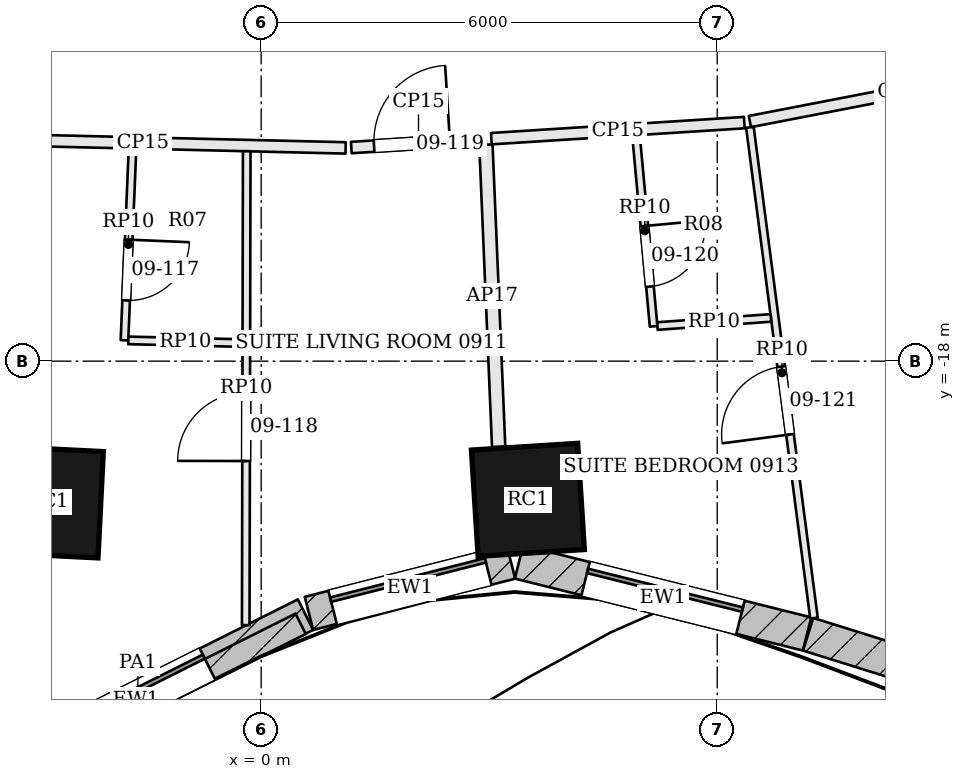
"""IFC4 building model, lengths in metres.
Left out: names, types, materials, properties, quantities, classifications, styles, units other than length and angle.
Written with IfcOpenShell. Run it as: python <this file> out.ifc"""

import sys

from ifc_helpers import new_model, si_unit, direction, frame, frame_2d, origin, origin_2d, place, context, subcontext, project, spatial, rectangle, extrude, element, fill, save


model = new_model("IFC4")
c1 = context("Model", 3, precision=1e-05, world=origin(), true_north=direction((0.0, 1.0)))
c2 = subcontext(c1, "Body", "Model", "MODEL_VIEW")
j1 = project(units=[si_unit("LENGTHUNIT", "METRE"), si_unit("PLANEANGLEUNIT", "RADIAN")], contexts=[c1])
p1 = place(None, origin())
s1 = spatial("IfcSite", under=j1, at=p1, CompositionType="ELEMENT")
p2 = place(p1, origin())
s2 = spatial("IfcBuilding", under=s1, at=p2, CompositionType="ELEMENT")
p3 = place(p2, frame((0.0, 0.0, 48.3)))
s3 = spatial("IfcBuildingStorey", under=s2, at=p3, CompositionType="ELEMENT", Elevation=48.3)
for number, where, z_axis, x_axis in (
    (1, (-2.811, -19.854, 0.0), (0.0, 0.0, 1.0), (0.999, -0.05, 0.0)),
    (2, (3.509, -19.824, 0.0), (0.0, 0.0, 1.0), (0.998, 0.063, 0.0)),
):
    element("IfcColumn", number, at=place(p3, frame(where, z_axis=z_axis, x_axis=x_axis)), inside=s3, PredefinedType="COLUMN", context=c2, shape_type="SweptSolid", body=[
        extrude(rectangle(XDim=1.4, YDim=1.4, at=origin_2d()), origin(), (0.0, 0.0, 1.0), 3.6),
    ])
p4 = place(p3, frame((-3.877, -23.568, 0.0), z_axis=(0.0, 0.0, 1.0), x_axis=(0.894241088759, 0.447585606532, 0.0)))
e3 = element("IfcWall", 3, at=p4, inside=s3, PredefinedType="SOLIDWALL", context=c2, shape_type="SweptSolid", body=[
    extrude(rectangle(XDim=4.987, YDim=0.45, at=frame_2d((2.494, 0.0))), origin(), (0.0, 0.0, 1.0), 3.4),
])
p5 = place(p4, frame((1.444, 0.0, 0.9)))
e4 = element("IfcOpeningElement", 4, at=p5, cuts=e3, PredefinedType="OPENING", context=c2, shape_type="SweptSolid", body=[
    extrude(rectangle(XDim=2.1, YDim=2.0, at=frame_2d((1.05, 1.0))), frame((0.0, 0.235, 0.0), z_axis=(0.0, -1.0, 0.0), x_axis=(1.0, 0.0, 0.0)), (0.0, 0.0, 1.0), 0.47),
])
p6 = place(p3, frame((0.628, -21.319, 0.0), z_axis=(0.0, 0.0, 1.0), x_axis=(0.969240543873, 0.246115355295, 0.0)))
e5 = element("IfcWall", 5, at=p6, inside=s3, PredefinedType="SOLIDWALL", context=c2, shape_type="SweptSolid", body=[
    extrude(rectangle(XDim=2.743, YDim=0.45, at=frame_2d((1.372, 0.0))), origin(), (0.0, 0.0, 1.0), 3.4),
])
p7 = place(p6, frame((0.321, 0.0, 0.9)))
e6 = element("IfcOpeningElement", 6, at=p7, cuts=e5, PredefinedType="OPENING", context=c2, shape_type="SweptSolid", body=[
    extrude(rectangle(XDim=2.1, YDim=2.0, at=frame_2d((1.05, 1.0))), frame((0.0, 0.235, 0.0), z_axis=(0.0, -1.0, 0.0), x_axis=(1.0, 0.0, 0.0)), (0.0, 0.0, 1.0), 0.47),
])
p8 = place(p3, frame((3.392, -20.642, 0.0), z_axis=(0.0, 0.0, 1.0), x_axis=(0.970168229467, -0.242432684539, 0.0)))
e7 = element("IfcWall", 7, at=p8, inside=s3, PredefinedType="SOLIDWALL", context=c2, shape_type="SweptSolid", body=[
    extrude(rectangle(XDim=3.906, YDim=0.45, at=frame_2d((1.953, 0.0))), origin(), (0.0, 0.0, 1.0), 3.4),
])
p9 = place(p8, frame((0.903, 0.0, 0.9)))
e8 = element("IfcOpeningElement", 8, at=p9, cuts=e7, PredefinedType="OPENING", context=c2, shape_type="SweptSolid", body=[
    extrude(rectangle(XDim=2.1, YDim=2.0, at=frame_2d((1.05, 1.0))), frame((0.0, 0.235, 0.0), z_axis=(0.0, -1.0, 0.0), x_axis=(1.0, 0.0, 0.0)), (0.0, 0.0, 1.0), 0.47),
])
p10 = place(p3, frame((7.196, -21.593, 0.0), z_axis=(0.0, 0.0, 1.0), x_axis=(0.954471218741, -0.298303021432, 0.0)))
e9 = element("IfcWall", 9, at=p10, inside=s3, PredefinedType="SOLIDWALL", context=c2, shape_type="SweptSolid", body=[
    extrude(rectangle(XDim=4.96, YDim=0.45, at=frame_2d((2.48, 0.0))), origin(), (0.0, 0.0, 1.0), 3.4),
])
p11 = place(p10, frame((1.43, 0.0, 0.9)))
e10 = element("IfcOpeningElement", 10, at=p11, cuts=e9, PredefinedType="OPENING", context=c2, shape_type="SweptSolid", body=[
    extrude(rectangle(XDim=2.1, YDim=2.0, at=frame_2d((1.05, 1.0))), frame((0.0, 0.235, 0.0), z_axis=(0.0, -1.0, 0.0), x_axis=(1.0, 0.0, 0.0)), (0.0, 0.0, 1.0), 0.47),
])
p12 = place(p3, frame((-3.763, -23.599, 3.6), z_axis=(0.0, 0.0, 1.0), x_axis=(0.894243576514, 0.447580636158, 0.0)))
e11 = element("IfcWall", 11, at=p12, inside=s3, PredefinedType="PARAPET", context=c2, shape_type="SweptSolid", body=[
    extrude(rectangle(XDim=4.789, YDim=0.3, at=frame_2d((2.394, 0.0))), origin(), (0.0, 0.0, 1.0), 1.1),
])
p13 = place(p3, frame((-4.221, -15.067, 0.0), z_axis=(0.0, 0.0, 1.0), x_axis=(0.999716725606, -0.023800599639, 0.0)))
e12 = element("IfcWall", 12, at=p13, inside=s3, PredefinedType="PARTITIONING", context=c2, shape_type="SweptSolid", body=[
    extrude(rectangle(XDim=5.334, YDim=0.15, at=frame_2d((2.667, 0.0))), origin(), (0.0, 0.0, 1.0), 2.68),
])
p14 = place(p3, frame((1.186, -15.19, 0.0), z_axis=(0.0, 0.0, 1.0), x_axis=(0.997996397867, 0.063270766108, 0.0)))
e13 = element("IfcWall", 13, at=p14, inside=s3, PredefinedType="PARTITIONING", context=c2, shape_type="SweptSolid", body=[
    extrude(rectangle(XDim=1.771, YDim=0.15, at=frame_2d((0.886, 0.0))), origin(), (0.0, 0.0, 1.0), 2.68),
])
p15 = place(p14, frame((0.3, 0.0, 0.0)))
e14 = element("IfcOpeningElement", 14, at=p15, cuts=e13, PredefinedType="OPENING", context=c2, shape_type="SweptSolid", body=[
    extrude(rectangle(XDim=1.0, YDim=2.1, at=frame_2d((0.5, 1.05))), frame((0.0, 0.085, 0.0), z_axis=(0.0, -1.0, 0.0), x_axis=(1.0, 0.0, 0.0)), (0.0, 0.0, 1.0), 0.17),
])
p16 = place(p3, frame((3.125, -19.127, 0.0), z_axis=(0.0, 0.0, 1.0), x_axis=(-0.042225344391, 0.999108112414, 0.0)))
e15 = element("IfcWall", 15, at=p16, inside=s3, PredefinedType="PARTITIONING", context=c2, shape_type="SweptSolid", body=[
    extrude(rectangle(XDim=3.978, YDim=0.175, at=frame_2d((1.989, 0.0))), origin(), (0.0, 0.0, 1.0), 2.68),
])
p17 = place(p3, frame((3.028, -15.073, 0.0), z_axis=(0.0, 0.0, 1.0), x_axis=(0.997992583289, 0.063330906356, 0.0)))
e16 = element("IfcWall", 16, at=p17, inside=s3, PredefinedType="PARTITIONING", context=c2, shape_type="SweptSolid", body=[
    extrude(rectangle(XDim=3.334, YDim=0.15, at=frame_2d((1.667, 0.0))), origin(), (0.0, 0.0, 1.0), 2.68),
])
p18 = place(p3, frame((6.43, -14.848, 0.0), z_axis=(0.0, 0.0, 1.0), x_axis=(0.981801609996, 0.189909448446, 0.0)))
e17 = element("IfcWall", 17, at=p18, inside=s3, PredefinedType="PARTITIONING", context=c2, shape_type="SweptSolid", body=[
    extrude(rectangle(XDim=4.118, YDim=0.15, at=frame_2d((2.059, 0.0))), origin(), (0.0, 0.0, 1.0), 2.68),
])
p19 = place(p3, frame((-0.203, -21.473, 0.0), z_axis=(0.0, 0.0, 1.0), x_axis=(0.00203625689, 0.999997926827, 0.0)))
e18 = element("IfcWall", 18, at=p19, inside=s3, PredefinedType="PARTITIONING", context=c2, shape_type="SweptSolid", body=[
    extrude(rectangle(XDim=6.235, YDim=0.1, at=frame_2d((3.117, 0.0))), origin(), (0.0, 0.0, 1.0), 2.934),
])
p20 = place(p19, frame((2.159, 0.0, 0.0)))
e19 = element("IfcOpeningElement", 19, at=p20, cuts=e18, PredefinedType="OPENING", context=c2, shape_type="SweptSolid", body=[
    extrude(rectangle(XDim=0.9, YDim=2.4, at=frame_2d((0.45, 1.2))), frame((0.0, 0.06, 0.0), z_axis=(0.0, -1.0, 0.0), x_axis=(1.0, 0.0, 0.0)), (0.0, 0.0, 1.0), 0.12),
])
p21 = place(p3, frame((-1.693, -15.203, 0.0), z_axis=(0.0, 0.0, 1.0), x_axis=(-0.041867833866, -0.999123157818, 0.0)))
e20 = element("IfcWall", 20, at=p21, inside=s3, PredefinedType="PARTITIONING", context=c2, shape_type="SweptSolid", body=[
    extrude(rectangle(XDim=2.525, YDim=0.1, at=frame_2d((1.262, 0.0))), origin(), (0.0, 0.0, 1.0), 2.934),
])
p22 = place(p21, frame((1.2, 0.0, 0.0)))
e21 = element("IfcOpeningElement", 21, at=p22, cuts=e20, PredefinedType="OPENING", context=c2, shape_type="SweptSolid", body=[
    extrude(rectangle(XDim=0.8, YDim=2.1, at=frame_2d((0.4, 1.05))), frame((0.0, 0.06, 0.0), z_axis=(0.0, -1.0, 0.0), x_axis=(1.0, 0.0, 0.0)), (0.0, 0.0, 1.0), 0.12),
])
p23 = place(p3, frame((-1.748, -17.727, 0.0), z_axis=(0.0, 0.0, 1.0), x_axis=(0.99971887768, -0.023710031862, 0.0)))
e22 = element("IfcWall", 22, at=p23, inside=s3, PredefinedType="PARTITIONING", context=c2, shape_type="SweptSolid", body=[
    extrude(rectangle(XDim=1.503, YDim=0.1, at=frame_2d((0.752, 0.0))), origin(), (0.0, 0.0, 1.0), 2.934),
])
p24 = place(p3, frame((7.273, -21.381, 0.0), z_axis=(0.0, 0.0, 1.0), x_axis=(-0.129491443272, 0.991580539401, 0.0)))
e23 = element("IfcWall", 23, at=p24, inside=s3, PredefinedType="PARTITIONING", context=c2, shape_type="SweptSolid", body=[
    extrude(rectangle(XDim=6.512, YDim=0.1, at=frame_2d((3.256, 0.0))), origin(), (0.0, 0.0, 1.0), 2.934),
])
p25 = place(p24, frame((2.437, 0.0, 0.0)))
e24 = element("IfcOpeningElement", 24, at=p25, cuts=e23, PredefinedType="OPENING", context=c2, shape_type="SweptSolid", body=[
    extrude(rectangle(XDim=0.9, YDim=2.4, at=frame_2d((0.45, 1.2))), frame((0.0, 0.06, 0.0), z_axis=(0.0, -1.0, 0.0), x_axis=(1.0, 0.0, 0.0)), (0.0, 0.0, 1.0), 0.12),
])
p26 = place(p3, frame((4.931, -15.027, 0.0), z_axis=(0.0, 0.0, 1.0), x_axis=(0.091956750327, -0.995763001958, 0.0)))
e25 = element("IfcWall", 25, at=p26, inside=s3, PredefinedType="PARTITIONING", context=c2, shape_type="SweptSolid", body=[
    extrude(rectangle(XDim=2.525, YDim=0.1, at=frame_2d((1.262, 0.0))), origin(), (0.0, 0.0, 1.0), 2.934),
])
p27 = place(p26, frame((1.2, 0.0, 0.0)))
e26 = element("IfcOpeningElement", 26, at=p27, cuts=e25, PredefinedType="OPENING", context=c2, shape_type="SweptSolid", body=[
    extrude(rectangle(XDim=0.8, YDim=2.1, at=frame_2d((0.4, 1.05))), frame((0.0, 0.06, 0.0), z_axis=(0.0, -1.0, 0.0), x_axis=(1.0, 0.0, 0.0)), (0.0, 0.0, 1.0), 0.12),
])
p28 = place(p3, frame((5.213, -17.538, 0.0), z_axis=(0.0, 0.0, 1.0), x_axis=(0.997447931568, 0.071397645698, 0.0)))
e27 = element("IfcWall", 27, at=p28, inside=s3, PredefinedType="PARTITIONING", context=c2, shape_type="SweptSolid", body=[
    extrude(rectangle(XDim=1.498, YDim=0.1, at=frame_2d((0.749, 0.0))), origin(), (0.0, 0.0, 1.0), 2.934),
])
p29 = place(p5, origin())
e28 = element("IfcWindow", 28, at=p29, inside=s3, PartitioningType="SINGLE_PANEL", PredefinedType="WINDOW", context=c2, shape_type="SweptSolid", body=[
    extrude(rectangle(XDim=2.1, YDim=2.0, at=frame_2d((1.05, 1.0))), frame((0.0, 0.135, 0.0), z_axis=(0.0, -1.0, 0.0), x_axis=(1.0, 0.0, 0.0)), (0.0, 0.0, 1.0), 0.06),
])
fill(e4, e28)
p30 = place(p7, origin())
e29 = element("IfcWindow", 29, at=p30, inside=s3, PartitioningType="SINGLE_PANEL", PredefinedType="WINDOW", context=c2, shape_type="SweptSolid", body=[
    extrude(rectangle(XDim=2.1, YDim=2.0, at=frame_2d((1.05, 1.0))), frame((0.0, 0.135, 0.0), z_axis=(0.0, -1.0, 0.0), x_axis=(1.0, 0.0, 0.0)), (0.0, 0.0, 1.0), 0.06),
])
fill(e6, e29)
p31 = place(p9, origin())
e30 = element("IfcWindow", 30, at=p31, inside=s3, PartitioningType="SINGLE_PANEL", PredefinedType="WINDOW", context=c2, shape_type="SweptSolid", body=[
    extrude(rectangle(XDim=2.1, YDim=2.0, at=frame_2d((1.05, 1.0))), frame((0.0, 0.135, 0.0), z_axis=(0.0, -1.0, 0.0), x_axis=(1.0, 0.0, 0.0)), (0.0, 0.0, 1.0), 0.06),
])
fill(e8, e30)
p32 = place(p22, origin())
e31 = element("IfcDoor", 31, at=p32, inside=s3, OperationType="SINGLE_SWING_LEFT", PredefinedType="DOOR", context=c2, shape_type="SweptSolid", body=[
    extrude(rectangle(XDim=0.8, YDim=2.1, at=frame_2d((0.4, 1.05))), frame((0.0, 0.025, 0.0), z_axis=(0.0, -1.0, 0.0), x_axis=(1.0, 0.0, 0.0)), (0.0, 0.0, 1.0), 0.05),
])
fill(e21, e31)
p33 = place(p20, origin())
e32 = element("IfcDoor", 32, at=p33, inside=s3, OperationType="SINGLE_SWING_LEFT", PredefinedType="DOOR", context=c2, shape_type="SweptSolid", body=[
    extrude(rectangle(XDim=0.9, YDim=2.4, at=frame_2d((0.45, 1.2))), frame((0.0, 0.025, 0.0), z_axis=(0.0, -1.0, 0.0), x_axis=(1.0, 0.0, 0.0)), (0.0, 0.0, 1.0), 0.05),
])
fill(e19, e32)
p34 = place(p15, origin())
e33 = element("IfcDoor", 33, at=p34, inside=s3, OperationType="SINGLE_SWING_RIGHT", PredefinedType="DOOR", context=c2, shape_type="SweptSolid", body=[
    extrude(rectangle(XDim=1.0, YDim=2.1, at=frame_2d((0.5, 1.05))), frame((0.0, 0.025, 0.0), z_axis=(0.0, -1.0, 0.0), x_axis=(1.0, 0.0, 0.0)), (0.0, 0.0, 1.0), 0.05),
])
fill(e14, e33)
p35 = place(p27, origin())
e34 = element("IfcDoor", 34, at=p35, inside=s3, OperationType="SINGLE_SWING_LEFT", PredefinedType="DOOR", context=c2, shape_type="SweptSolid", body=[
    extrude(rectangle(XDim=0.8, YDim=2.1, at=frame_2d((0.4, 1.05))), frame((0.0, 0.025, 0.0), z_axis=(0.0, -1.0, 0.0), x_axis=(1.0, 0.0, 0.0)), (0.0, 0.0, 1.0), 0.05),
])
fill(e26, e34)
p36 = place(p25, origin())
e35 = element("IfcDoor", 35, at=p36, inside=s3, OperationType="SINGLE_SWING_LEFT", PredefinedType="DOOR", context=c2, shape_type="SweptSolid", body=[
    extrude(rectangle(XDim=0.9, YDim=2.4, at=frame_2d((0.45, 1.2))), frame((0.0, 0.025, 0.0), z_axis=(0.0, -1.0, 0.0), x_axis=(1.0, 0.0, 0.0)), (0.0, 0.0, 1.0), 0.05),
])
fill(e24, e35)
save(model, sys.argv[1])
